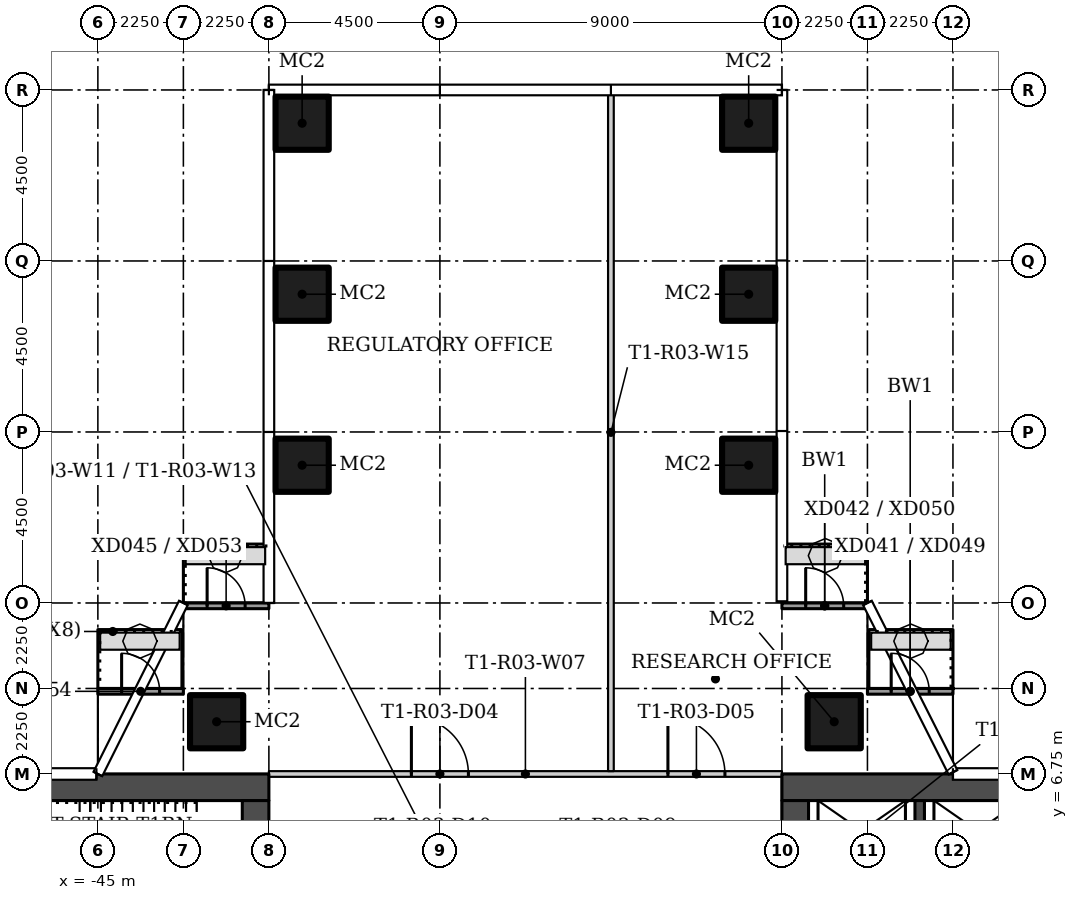
"""IFC4 building model, lengths in metres.
Left out: names, types, materials, properties, quantities, classifications, styles, units other than length and angle.
Written with IfcOpenShell. Run it as: python <this file> out.ifc"""

import sys

from ifc_helpers import new_model, si_unit, direction, frame, frame_2d, origin, origin_2d, place, context, subcontext, project, spatial, rectangle, hollow_rectangle, extrude, element, fill, save


model = new_model("IFC4")
c1 = context("Model", 3, precision=1e-05, world=origin(), true_north=direction((0.0, 1.0)))
c2 = subcontext(c1, "Body", "Model", "MODEL_VIEW")
j1 = project(units=[si_unit("LENGTHUNIT", "METRE"), si_unit("PLANEANGLEUNIT", "RADIAN")], contexts=[c1])
p1 = place(None, origin())
s1 = spatial("IfcSite", under=j1, at=p1, CompositionType="ELEMENT")
p2 = place(p1, origin())
s2 = spatial("IfcBuilding", under=s1, at=p2, CompositionType="ELEMENT")
p3 = place(p2, frame((0.0, 0.0, 42.0)))
s3 = spatial("IfcBuildingStorey", under=s2, at=p3, CompositionType="ELEMENT", Elevation=42.0)
for number, where in (
    (1, (-25.625, 8.125, 0.0)),
    (2, (-41.875, 8.125, 0.0)),
    (3, (-39.625, 14.875, 0.0)),
    (4, (-39.625, 19.375, 0.0)),
    (5, (-39.625, 23.875, 0.0)),
    (6, (-27.875, 14.875, 0.0)),
    (7, (-27.875, 19.375, 0.0)),
    (8, (-27.875, 23.875, 0.0)),
):
    element("IfcColumn", number, at=place(p3, frame(where)), inside=s3, PredefinedType="COLUMN", context=c2, shape_type="SweptSolid", body=[
        extrude(hollow_rectangle(XDim=1.4, YDim=1.4, WallThickness=0.05, at=origin_2d()), origin(), (0.0, 0.0, 1.0), 3.55),
    ])
p4 = place(p3, frame((-40.5, 6.75, 0.0)))
e9 = element("IfcWall", 9, at=p4, inside=s3, PredefinedType="PARTITIONING", context=c2, shape_type="SweptSolid", body=[
    extrude(rectangle(XDim=13.5, YDim=0.15, at=frame_2d((6.75, 0.0))), origin(), (0.0, 0.0, 1.0), 3.55),
])
p5 = place(p4, frame((3.75, 0.0, 0.0)))
e10 = element("IfcOpeningElement", 10, at=p5, cuts=e9, PredefinedType="OPENING", context=c2, shape_type="SweptSolid", body=[
    extrude(rectangle(XDim=1.5, YDim=2.1, at=frame_2d((0.75, 1.05))), frame((0.0, 0.085, 0.0), z_axis=(0.0, -1.0, 0.0), x_axis=(1.0, 0.0, 0.0)), (0.0, 0.0, 1.0), 0.17),
])
p6 = place(p4, frame((10.5, 0.0, 0.0)))
e11 = element("IfcOpeningElement", 11, at=p6, cuts=e9, PredefinedType="OPENING", context=c2, shape_type="SweptSolid", body=[
    extrude(rectangle(XDim=1.5, YDim=2.1, at=frame_2d((0.75, 1.05))), frame((0.0, 0.085, 0.0), z_axis=(0.0, -1.0, 0.0), x_axis=(1.0, 0.0, 0.0)), (0.0, 0.0, 1.0), 0.17),
])
p7 = place(p3, frame((-31.5, 6.825, 0.0), z_axis=(0.0, 0.0, 1.0), x_axis=(0.0, 1.0, 0.0)))
e12 = element("IfcWall", 12, at=p7, inside=s3, PredefinedType="PARTITIONING", context=c2, shape_type="SweptSolid", body=[
    extrude(rectangle(XDim=17.83, YDim=0.15, at=frame_2d((8.915, 0.0))), origin(), (0.0, 0.0, 1.0), 3.55),
])
p8 = place(p3, frame((-24.75, 8.925, 0.0)))
e13 = element("IfcWall", 13, at=p8, inside=s3, PredefinedType="SOLIDWALL", context=c2, shape_type="SweptSolid", body=[
    extrude(rectangle(XDim=2.25, YDim=0.15, at=frame_2d((1.125, 0.0))), origin(), (0.0, 0.0, 1.0), 3.45),
])
p9 = place(p8, frame((0.625, 0.0, 0.0)))
e14 = element("IfcOpeningElement", 14, at=p9, cuts=e13, PredefinedType="OPENING", context=c2, shape_type="SweptSolid", body=[
    extrude(rectangle(XDim=1.0, YDim=2.4, at=frame_2d((0.5, 1.2))), frame((0.0, 0.085, 0.0), z_axis=(0.0, -1.0, 0.0), x_axis=(1.0, 0.0, 0.0)), (0.0, 0.0, 1.0), 0.17),
])
p10 = place(p3, frame((-27.0, 11.175, 0.0)))
e15 = element("IfcWall", 15, at=p10, inside=s3, PredefinedType="SOLIDWALL", context=c2, shape_type="SweptSolid", body=[
    extrude(rectangle(XDim=2.25, YDim=0.15, at=frame_2d((1.125, 0.0))), origin(), (0.0, 0.0, 1.0), 3.45),
])
p11 = place(p10, frame((0.625, 0.0, 0.0)))
e16 = element("IfcOpeningElement", 16, at=p11, cuts=e15, PredefinedType="OPENING", context=c2, shape_type="SweptSolid", body=[
    extrude(rectangle(XDim=1.0, YDim=2.4, at=frame_2d((0.5, 1.2))), frame((0.0, 0.085, 0.0), z_axis=(0.0, -1.0, 0.0), x_axis=(1.0, 0.0, 0.0)), (0.0, 0.0, 1.0), 0.17),
])
p12 = place(p3, frame((-42.75, 11.175, 0.0)))
e17 = element("IfcWall", 17, at=p12, inside=s3, PredefinedType="SOLIDWALL", context=c2, shape_type="SweptSolid", body=[
    extrude(rectangle(XDim=2.25, YDim=0.15, at=frame_2d((1.125, 0.0))), origin(), (0.0, 0.0, 1.0), 3.45),
])
p13 = place(p12, frame((0.625, 0.0, 0.0)))
e18 = element("IfcOpeningElement", 18, at=p13, cuts=e17, PredefinedType="OPENING", context=c2, shape_type="SweptSolid", body=[
    extrude(rectangle(XDim=1.0, YDim=2.4, at=frame_2d((0.5, 1.2))), frame((0.0, 0.085, 0.0), z_axis=(0.0, -1.0, 0.0), x_axis=(1.0, 0.0, 0.0)), (0.0, 0.0, 1.0), 0.17),
])
p14 = place(p3, frame((-45.0, 8.925, 0.0)))
e19 = element("IfcWall", 19, at=p14, inside=s3, PredefinedType="SOLIDWALL", context=c2, shape_type="SweptSolid", body=[
    extrude(rectangle(XDim=2.25, YDim=0.15, at=frame_2d((1.125, 0.0))), origin(), (0.0, 0.0, 1.0), 3.45),
])
p15 = place(p14, frame((0.625, 0.0, 0.0)))
e20 = element("IfcOpeningElement", 20, at=p15, cuts=e19, PredefinedType="OPENING", context=c2, shape_type="SweptSolid", body=[
    extrude(rectangle(XDim=1.0, YDim=2.4, at=frame_2d((0.5, 1.2))), frame((0.0, 0.085, 0.0), z_axis=(0.0, -1.0, 0.0), x_axis=(1.0, 0.0, 0.0)), (0.0, 0.0, 1.0), 0.17),
])
p16 = place(p3, frame((-27.0, 6.4, 0.0)))
e21 = element("IfcWall", 21, at=p16, inside=s3, PredefinedType="SHEAR", context=c2, shape_type="SweptSolid", body=[
    extrude(rectangle(XDim=13.5, YDim=0.7, at=frame_2d((6.75, 0.0))), origin(), (0.0, 0.0, 1.0), 3.55),
])
p17 = place(p3, frame((-26.65, 6.05, 0.0), z_axis=(0.0, 0.0, 1.0), x_axis=(0.0, -1.0, 0.0)))
e22 = element("IfcWall", 22, at=p17, inside=s3, PredefinedType="SHEAR", context=c2, shape_type="SweptSolid", body=[
    extrude(rectangle(XDim=12.1, YDim=0.7, at=frame_2d((6.05, 0.0))), origin(), (0.0, 0.0, 1.0), 3.55),
])
p18 = place(p17, frame((3.9, 0.0, 0.0)))
e23 = element("IfcOpeningElement", 23, at=p18, cuts=e22, PredefinedType="OPENING", context=c2, shape_type="SweptSolid", body=[
    extrude(rectangle(XDim=1.8, YDim=2.4, at=frame_2d((0.9, 1.2))), frame((0.0, 0.36, 0.0), z_axis=(0.0, -1.0, 0.0), x_axis=(1.0, 0.0, 0.0)), (0.0, 0.0, 1.0), 0.72),
])
p19 = place(p3, frame((-23.375, 3.25, 0.0), z_axis=(0.0, 0.0, 1.0), x_axis=(0.0, 1.0, 0.0)))
e24 = element("IfcWall", 24, at=p19, inside=s3, PredefinedType="SHEAR", context=c2, shape_type="SweptSolid", body=[
    extrude(rectangle(XDim=2.8, YDim=0.25, at=frame_2d((1.4, 0.0))), origin(), (0.0, 0.0, 1.0), 3.55),
])
p20 = place(p3, frame((-40.5, 6.4, 0.0), z_axis=(0.0, 0.0, 1.0), x_axis=(-1.0, 0.0, 0.0)))
e25 = element("IfcWall", 25, at=p20, inside=s3, PredefinedType="SHEAR", context=c2, shape_type="SweptSolid", body=[
    extrude(rectangle(XDim=13.5, YDim=0.7, at=frame_2d((6.75, 0.0))), origin(), (0.0, 0.0, 1.0), 3.55),
])
p21 = place(p3, frame((-40.85, -6.05, 0.0), z_axis=(0.0, 0.0, 1.0), x_axis=(0.0, 1.0, 0.0)))
e26 = element("IfcWall", 26, at=p21, inside=s3, PredefinedType="SHEAR", context=c2, shape_type="SweptSolid", body=[
    extrude(rectangle(XDim=12.1, YDim=0.7, at=frame_2d((6.05, 0.0))), origin(), (0.0, 0.0, 1.0), 3.55),
])
p22 = place(p21, frame((6.4, 0.0, 0.0)))
e27 = element("IfcOpeningElement", 27, at=p22, cuts=e26, PredefinedType="OPENING", context=c2, shape_type="SweptSolid", body=[
    extrude(rectangle(XDim=1.8, YDim=2.4, at=frame_2d((0.9, 1.2))), frame((0.0, 0.36, 0.0), z_axis=(0.0, -1.0, 0.0), x_axis=(1.0, 0.0, 0.0)), (0.0, 0.0, 1.0), 0.72),
])
p23 = place(p5, origin())
e28 = element("IfcDoor", 28, at=p23, inside=s3, OperationType="DOUBLE_DOOR_SINGLE_SWING", PredefinedType="DOOR", context=c2, shape_type="SweptSolid", body=[
    extrude(rectangle(XDim=1.5, YDim=2.1, at=frame_2d((0.75, 1.05))), frame((0.0, 0.025, 0.0), z_axis=(0.0, -1.0, 0.0), x_axis=(1.0, 0.0, 0.0)), (0.0, 0.0, 1.0), 0.05),
])
fill(e10, e28)
p24 = place(p6, origin())
e29 = element("IfcDoor", 29, at=p24, inside=s3, OperationType="DOUBLE_DOOR_SINGLE_SWING", PredefinedType="DOOR", context=c2, shape_type="SweptSolid", body=[
    extrude(rectangle(XDim=1.5, YDim=2.1, at=frame_2d((0.75, 1.05))), frame((0.0, 0.025, 0.0), z_axis=(0.0, -1.0, 0.0), x_axis=(1.0, 0.0, 0.0)), (0.0, 0.0, 1.0), 0.05),
])
fill(e11, e29)
p25 = place(p9, origin())
e30 = element("IfcDoor", 30, at=p25, inside=s3, OperationType="SINGLE_SWING_RIGHT", PredefinedType="DOOR", context=c2, shape_type="SweptSolid", body=[
    extrude(rectangle(XDim=1.0, YDim=2.4, at=frame_2d((0.5, 1.2))), frame((0.0, 0.025, 0.0), z_axis=(0.0, -1.0, 0.0), x_axis=(1.0, 0.0, 0.0)), (0.0, 0.0, 1.0), 0.05),
])
fill(e14, e30)
p26 = place(p11, origin())
e31 = element("IfcDoor", 31, at=p26, inside=s3, OperationType="SINGLE_SWING_LEFT", PredefinedType="DOOR", context=c2, shape_type="SweptSolid", body=[
    extrude(rectangle(XDim=1.0, YDim=2.4, at=frame_2d((0.5, 1.2))), frame((0.0, 0.025, 0.0), z_axis=(0.0, -1.0, 0.0), x_axis=(1.0, 0.0, 0.0)), (0.0, 0.0, 1.0), 0.05),
])
fill(e16, e31)
p27 = place(p13, origin())
e32 = element("IfcDoor", 32, at=p27, inside=s3, OperationType="SINGLE_SWING_LEFT", PredefinedType="DOOR", context=c2, shape_type="SweptSolid", body=[
    extrude(rectangle(XDim=1.0, YDim=2.4, at=frame_2d((0.5, 1.2))), frame((0.0, 0.025, 0.0), z_axis=(0.0, -1.0, 0.0), x_axis=(1.0, 0.0, 0.0)), (0.0, 0.0, 1.0), 0.05),
])
fill(e18, e32)
p28 = place(p15, origin())
e33 = element("IfcDoor", 33, at=p28, inside=s3, OperationType="SINGLE_SWING_RIGHT", PredefinedType="DOOR", context=c2, shape_type="SweptSolid", body=[
    extrude(rectangle(XDim=1.0, YDim=2.4, at=frame_2d((0.5, 1.2))), frame((0.0, 0.025, 0.0), z_axis=(0.0, -1.0, 0.0), x_axis=(1.0, 0.0, 0.0)), (0.0, 0.0, 1.0), 0.05),
])
fill(e20, e33)
save(model, sys.argv[1])
